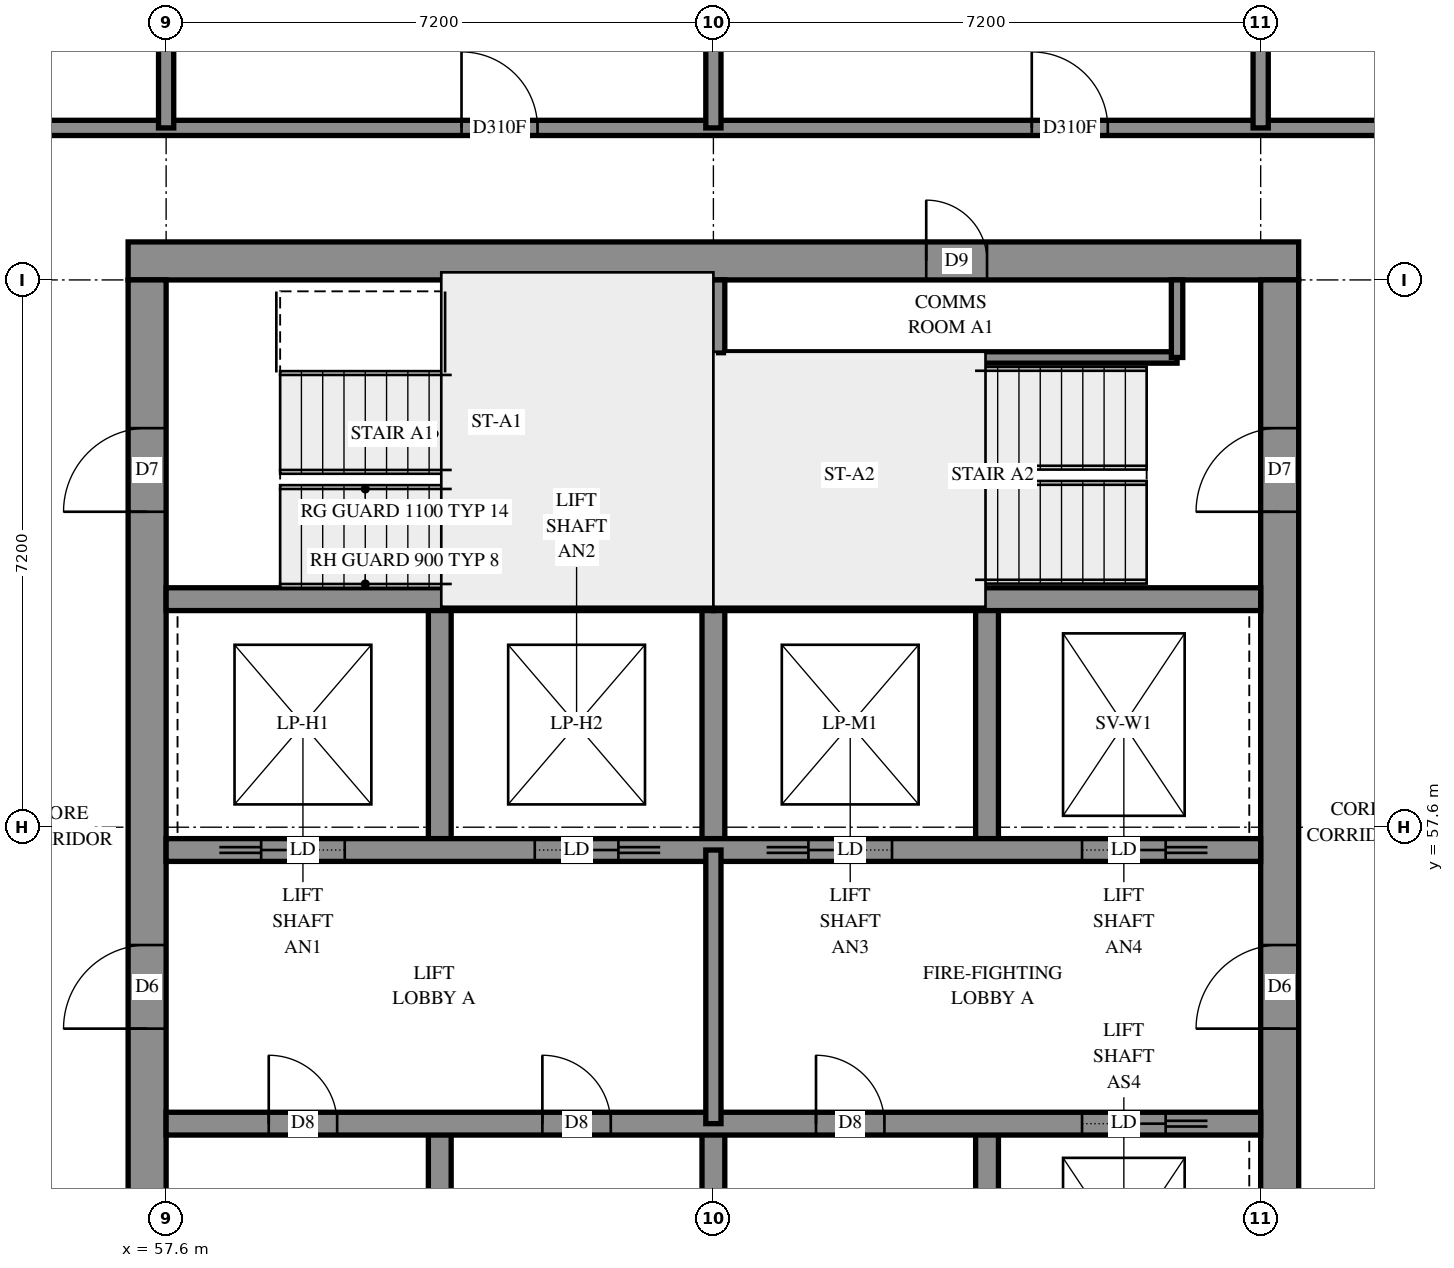
"""IFC4 building model, lengths in metres.
Left out: names, types, materials, properties, quantities, classifications, styles, units other than length and angle.
Written with IfcOpenShell. Run it as: python <this file> out.ifc"""

import sys

from ifc_helpers import new_model, si_unit, direction, frame, frame_2d, origin, place, context, subcontext, project, spatial, rectangle, extrude, element, fill, save


model = new_model("IFC4")
c1 = context("Model", 3, precision=1e-05, world=origin(), true_north=direction((0.0, 1.0)))
c2 = subcontext(c1, "Body", "Model", "MODEL_VIEW")
j1 = project(units=[si_unit("LENGTHUNIT", "METRE"), si_unit("PLANEANGLEUNIT", "RADIAN")], contexts=[c1])
p1 = place(None, origin())
s1 = spatial("IfcSite", under=j1, at=p1, CompositionType="ELEMENT")
p2 = place(p1, origin())
s2 = spatial("IfcBuilding", under=s1, at=p2, CompositionType="ELEMENT")
p3 = place(p2, frame((0.0, 0.0, 196.4)))
s3 = spatial("IfcBuildingStorey", under=s2, at=p3, CompositionType="ELEMENT", Elevation=196.4)
p4 = place(p3, frame((57.1, 65.05, -0.3), z_axis=(0.0, 0.0, 1.0), x_axis=(1.0, 0.0, 0.0)))
e1 = element("IfcWall", 1, at=p4, inside=s3, PredefinedType="SHEAR", context=c2, shape_type="SweptSolid", body=[
    extrude(rectangle(XDim=15.4, YDim=0.5, at=frame_2d((7.7, 0.0))), origin(), (0.0, 0.0, 1.0), 2.7),
])
p5 = place(p4, frame((10.5, 0.0, 0.3)))
e2 = element("IfcOpeningElement", 2, at=p5, cuts=e1, PredefinedType="OPENING", context=c2, shape_type="SweptSolid", body=[
    extrude(rectangle(XDim=0.8, YDim=2.1, at=frame_2d((0.4, 1.05))), frame((0.0, 0.26, 0.0), z_axis=(0.0, -1.0, 0.0), x_axis=(1.0, 0.0, 0.0)), (0.0, 0.0, 1.0), 0.52),
])
p6 = place(p3, frame((57.35, 50.4, -0.3), z_axis=(0.0, 0.0, 1.0), x_axis=(0.0, 1.0, 0.0)))
e3 = element("IfcWall", 3, at=p6, inside=s3, PredefinedType="SHEAR", context=c2, shape_type="SweptSolid", body=[
    extrude(rectangle(XDim=14.4, YDim=0.5, at=frame_2d((7.2, 0.0))), origin(), (0.0, 0.0, 1.0), 2.7),
])
p7 = place(p6, frame((4.55, 0.0, 0.3)))
e4 = element("IfcOpeningElement", 4, at=p7, cuts=e3, PredefinedType="OPENING", context=c2, shape_type="SweptSolid", body=[
    extrude(rectangle(XDim=1.1, YDim=2.1, at=frame_2d((0.55, 1.05))), frame((0.0, 0.26, 0.0), z_axis=(0.0, -1.0, 0.0), x_axis=(1.0, 0.0, 0.0)), (0.0, 0.0, 1.0), 0.52),
])
p8 = place(p6, frame((11.35, 0.0, 0.3)))
e5 = element("IfcOpeningElement", 5, at=p8, cuts=e3, PredefinedType="OPENING", context=c2, shape_type="SweptSolid", body=[
    extrude(rectangle(XDim=1.1, YDim=2.1, at=frame_2d((0.55, 1.05))), frame((0.0, 0.26, 0.0), z_axis=(0.0, -1.0, 0.0), x_axis=(1.0, 0.0, 0.0)), (0.0, 0.0, 1.0), 0.52),
])
p9 = place(p3, frame((72.25, 50.4, -0.3), z_axis=(0.0, 0.0, 1.0), x_axis=(0.0, 1.0, 0.0)))
e6 = element("IfcWall", 6, at=p9, inside=s3, PredefinedType="SHEAR", context=c2, shape_type="SweptSolid", body=[
    extrude(rectangle(XDim=14.4, YDim=0.5, at=frame_2d((7.2, 0.0))), origin(), (0.0, 0.0, 1.0), 2.7),
])
p10 = place(p9, frame((4.55, 0.0, 0.3)))
e7 = element("IfcOpeningElement", 7, at=p10, cuts=e6, PredefinedType="OPENING", context=c2, shape_type="SweptSolid", body=[
    extrude(rectangle(XDim=1.1, YDim=2.1, at=frame_2d((0.55, 1.05))), frame((0.0, 0.26, 0.0), z_axis=(0.0, -1.0, 0.0), x_axis=(1.0, 0.0, 0.0)), (0.0, 0.0, 1.0), 0.52),
])
p11 = place(p9, frame((11.35, 0.0, 0.3)))
e8 = element("IfcOpeningElement", 8, at=p11, cuts=e6, PredefinedType="OPENING", context=c2, shape_type="SweptSolid", body=[
    extrude(rectangle(XDim=1.1, YDim=2.1, at=frame_2d((0.55, 1.05))), frame((0.0, 0.26, 0.0), z_axis=(0.0, -1.0, 0.0), x_axis=(1.0, 0.0, 0.0)), (0.0, 0.0, 1.0), 0.52),
])
for number, where, z_axis, x_axis in (
    (9, (61.2, 50.4, 0.0), (0.0, 0.0, 1.0), (0.0, 1.0, 0.0)),
    (10, (61.2, 57.3, 0.0), (0.0, 0.0, 1.0), (0.0, 1.0, 0.0)),
    (11, (64.8, 50.4, 0.0), (0.0, 0.0, 1.0), (0.0, 1.0, 0.0)),
    (12, (64.8, 57.3, 0.0), (0.0, 0.0, 1.0), (0.0, 1.0, 0.0)),
    (13, (68.4, 50.4, 0.0), (0.0, 0.0, 1.0), (0.0, 1.0, 0.0)),
    (14, (68.4, 57.3, 0.0), (0.0, 0.0, 1.0), (0.0, 1.0, 0.0)),
):
    element("IfcWall", number, at=place(p3, frame(where, z_axis=z_axis, x_axis=x_axis)), inside=s3, PredefinedType="SOLIDWALL", context=c2, shape_type="SweptSolid", body=[
        extrude(rectangle(XDim=3.3, YDim=0.3, at=frame_2d((1.65, 0.0))), origin(), (0.0, 0.0, 1.0), 3.1),
    ])
p12 = place(p3, frame((57.6, 53.7, 0.0), z_axis=(0.0, 0.0, 1.0), x_axis=(1.0, 0.0, 0.0)))
e15 = element("IfcWall", 15, at=p12, inside=s3, PredefinedType="SOLIDWALL", context=c2, shape_type="SweptSolid", body=[
    extrude(rectangle(XDim=14.4, YDim=0.3, at=frame_2d((7.2, 0.0))), origin(), (0.0, 0.0, 1.0), 3.1),
])
p13 = place(p12, frame((1.35, 0.0, 0.0)))
e16 = element("IfcOpeningElement", 16, at=p13, cuts=e15, PredefinedType="OPENING", context=c2, shape_type="SweptSolid", body=[
    extrude(rectangle(XDim=0.9, YDim=2.1, at=frame_2d((0.45, 1.05))), frame((0.0, 0.16, 0.0), z_axis=(0.0, -1.0, 0.0), x_axis=(1.0, 0.0, 0.0)), (0.0, 0.0, 1.0), 0.32),
])
p14 = place(p12, frame((4.95, 0.0, 0.0)))
e17 = element("IfcOpeningElement", 17, at=p14, cuts=e15, PredefinedType="OPENING", context=c2, shape_type="SweptSolid", body=[
    extrude(rectangle(XDim=0.9, YDim=2.1, at=frame_2d((0.45, 1.05))), frame((0.0, 0.16, 0.0), z_axis=(0.0, -1.0, 0.0), x_axis=(1.0, 0.0, 0.0)), (0.0, 0.0, 1.0), 0.32),
])
p15 = place(p12, frame((8.55, 0.0, 0.0)))
e18 = element("IfcOpeningElement", 18, at=p15, cuts=e15, PredefinedType="OPENING", context=c2, shape_type="SweptSolid", body=[
    extrude(rectangle(XDim=0.9, YDim=2.1, at=frame_2d((0.45, 1.05))), frame((0.0, 0.16, 0.0), z_axis=(0.0, -1.0, 0.0), x_axis=(1.0, 0.0, 0.0)), (0.0, 0.0, 1.0), 0.32),
])
p16 = place(p12, frame((12.05, 0.0, 0.0)))
e19 = element("IfcOpeningElement", 19, at=p16, cuts=e15, PredefinedType="OPENING", context=c2, shape_type="SweptSolid", body=[
    extrude(rectangle(XDim=1.1, YDim=2.1, at=frame_2d((0.55, 1.05))), frame((0.0, 0.16, 0.0), z_axis=(0.0, -1.0, 0.0), x_axis=(1.0, 0.0, 0.0)), (0.0, 0.0, 1.0), 0.32),
])
p17 = place(p3, frame((57.6, 57.3, 0.0), z_axis=(0.0, 0.0, 1.0), x_axis=(1.0, 0.0, 0.0)))
e20 = element("IfcWall", 20, at=p17, inside=s3, PredefinedType="SOLIDWALL", context=c2, shape_type="SweptSolid", body=[
    extrude(rectangle(XDim=14.4, YDim=0.3, at=frame_2d((7.2, 0.0))), origin(), (0.0, 0.0, 1.0), 3.1),
])
p18 = place(p17, frame((1.25, 0.0, 0.0)))
e21 = element("IfcOpeningElement", 21, at=p18, cuts=e20, PredefinedType="OPENING", context=c2, shape_type="SweptSolid", body=[
    extrude(rectangle(XDim=1.1, YDim=2.1, at=frame_2d((0.55, 1.05))), frame((0.0, 0.16, 0.0), z_axis=(0.0, -1.0, 0.0), x_axis=(1.0, 0.0, 0.0)), (0.0, 0.0, 1.0), 0.32),
])
p19 = place(p17, frame((4.85, 0.0, 0.0)))
e22 = element("IfcOpeningElement", 22, at=p19, cuts=e20, PredefinedType="OPENING", context=c2, shape_type="SweptSolid", body=[
    extrude(rectangle(XDim=1.1, YDim=2.1, at=frame_2d((0.55, 1.05))), frame((0.0, 0.16, 0.0), z_axis=(0.0, -1.0, 0.0), x_axis=(1.0, 0.0, 0.0)), (0.0, 0.0, 1.0), 0.32),
])
p20 = place(p17, frame((8.45, 0.0, 0.0)))
e23 = element("IfcOpeningElement", 23, at=p20, cuts=e20, PredefinedType="OPENING", context=c2, shape_type="SweptSolid", body=[
    extrude(rectangle(XDim=1.1, YDim=2.1, at=frame_2d((0.55, 1.05))), frame((0.0, 0.16, 0.0), z_axis=(0.0, -1.0, 0.0), x_axis=(1.0, 0.0, 0.0)), (0.0, 0.0, 1.0), 0.32),
])
p21 = place(p17, frame((12.05, 0.0, 0.0)))
e24 = element("IfcOpeningElement", 24, at=p21, cuts=e20, PredefinedType="OPENING", context=c2, shape_type="SweptSolid", body=[
    extrude(rectangle(XDim=1.1, YDim=2.1, at=frame_2d((0.55, 1.05))), frame((0.0, 0.16, 0.0), z_axis=(0.0, -1.0, 0.0), x_axis=(1.0, 0.0, 0.0)), (0.0, 0.0, 1.0), 0.32),
])
for number, where, z_axis, x_axis in (
    (25, (57.6, 60.6, 0.0), (0.0, 0.0, 1.0), (1.0, 0.0, 0.0)),
    (26, (64.8, 60.6, 0.0), (0.0, 0.0, 1.0), (1.0, 0.0, 0.0)),
):
    element("IfcWall", number, at=place(p3, frame(where, z_axis=z_axis, x_axis=x_axis)), inside=s3, PredefinedType="SOLIDWALL", context=c2, shape_type="SweptSolid", body=[
        extrude(rectangle(XDim=7.2, YDim=0.3, at=frame_2d((3.6, 0.0))), origin(), (0.0, 0.0, 1.0), 3.1),
    ])
p22 = place(p3, frame((64.8, 60.6, 0.0), z_axis=(0.0, 0.0, 1.0), x_axis=(0.0, 1.0, 0.0)))
e27 = element("IfcWall", 27, at=p22, inside=s3, PredefinedType="SOLIDWALL", context=c2, shape_type="SweptSolid", body=[
    extrude(rectangle(XDim=4.2, YDim=0.3, at=frame_2d((2.1, 0.0))), origin(), (0.0, 0.0, 1.0), 3.1),
])
p23 = place(p3, frame((64.95, 63.78, 0.0), z_axis=(0.0, 0.0, 1.0), x_axis=(1.0, 0.0, 0.0)))
e28 = element("IfcWall", 28, at=p23, inside=s3, PredefinedType="PARTITIONING", context=c2, shape_type="SweptSolid", body=[
    extrude(rectangle(XDim=5.95, YDim=0.15, at=frame_2d((2.975, 0.0))), origin(), (0.0, 0.0, 1.0), 3.1),
])
p24 = place(p3, frame((70.9, 63.78, 0.0), z_axis=(0.0, 0.0, 1.0), x_axis=(0.0, 1.0, 0.0)))
e29 = element("IfcWall", 29, at=p24, inside=s3, PredefinedType="PARTITIONING", context=c2, shape_type="SweptSolid", body=[
    extrude(rectangle(XDim=1.02, YDim=0.15, at=frame_2d((0.51, 0.0))), origin(), (0.0, 0.0, 1.0), 3.1),
])
p25 = place(p3, frame((64.8, 53.7, 0.0), z_axis=(0.0, 0.0, 1.0), x_axis=(0.0, 1.0, 0.0)))
e30 = element("IfcWall", 30, at=p25, inside=s3, PredefinedType="PARTITIONING", context=c2, shape_type="SweptSolid", body=[
    extrude(rectangle(XDim=3.6, YDim=0.2, at=frame_2d((1.8, 0.0))), origin(), (0.0, 0.0, 1.0), 3.1),
])
p26 = place(p3, frame((55.6, 66.8, 0.0), z_axis=(0.0, 0.0, 1.0), x_axis=(1.0, 0.0, 0.0)))
e31 = element("IfcWall", 31, at=p26, inside=s3, PredefinedType="PARTITIONING", context=c2, shape_type="SweptSolid", body=[
    extrude(rectangle(XDim=18.4, YDim=0.2, at=frame_2d((9.2, 0.0))), origin(), (0.0, 0.0, 1.0), 3.1),
])
p27 = place(p26, frame((5.886, 0.0, 0.0)))
e32 = element("IfcOpeningElement", 32, at=p27, cuts=e31, PredefinedType="OPENING", context=c2, shape_type="SweptSolid", body=[
    extrude(rectangle(XDim=1.0, YDim=2.1, at=frame_2d((0.5, 1.05))), frame((0.0, 0.11, 0.0), z_axis=(0.0, -1.0, 0.0), x_axis=(1.0, 0.0, 0.0)), (0.0, 0.0, 1.0), 0.22),
])
p28 = place(p26, frame((13.389, 0.0, 0.0)))
e33 = element("IfcOpeningElement", 33, at=p28, cuts=e31, PredefinedType="OPENING", context=c2, shape_type="SweptSolid", body=[
    extrude(rectangle(XDim=1.0, YDim=2.1, at=frame_2d((0.5, 1.05))), frame((0.0, 0.11, 0.0), z_axis=(0.0, -1.0, 0.0), x_axis=(1.0, 0.0, 0.0)), (0.0, 0.0, 1.0), 0.22),
])
for number, where, z_axis, x_axis in (
    (34, (57.6, 66.8, 0.0), (0.0, 0.0, 1.0), (0.0, 1.0, 0.0)),
    (35, (64.8, 66.8, 0.0), (0.0, 0.0, 1.0), (0.0, 1.0, 0.0)),
):
    element("IfcWall", number, at=place(p3, frame(where, z_axis=z_axis, x_axis=x_axis)), inside=s3, PredefinedType="PARTITIONING", context=c2, shape_type="SweptSolid", body=[
        extrude(rectangle(XDim=4.8, YDim=0.2, at=frame_2d((2.4, 0.0))), origin(), (0.0, 0.0, 1.0), 3.1),
    ])
p29 = place(p3, frame((72.0, 66.8, 0.0), z_axis=(0.0, 0.0, 1.0), x_axis=(0.0, 1.0, 0.0)))
e36 = element("IfcWall", 36, at=p29, inside=s3, PredefinedType="PARTITIONING", context=c2, shape_type="SweptSolid", body=[
    extrude(rectangle(XDim=4.696, YDim=0.2, at=frame_2d((2.348, 0.0))), origin(), (0.0, 0.0, 1.0), 3.1),
])
p30 = place(p5, origin())
e37 = element("IfcDoor", 37, at=p30, inside=s3, OperationType="SINGLE_SWING_RIGHT", PredefinedType="DOOR", context=c2, shape_type="SweptSolid", body=[
    extrude(rectangle(XDim=0.8, YDim=2.1, at=frame_2d((0.4, 1.05))), frame((0.0, 0.025, 0.0), z_axis=(0.0, -1.0, 0.0), x_axis=(1.0, 0.0, 0.0)), (0.0, 0.0, 1.0), 0.05),
])
fill(e2, e37)
p31 = place(p7, origin())
e38 = element("IfcDoor", 38, at=p31, inside=s3, OperationType="DOUBLE_DOOR_SINGLE_SWING", PredefinedType="DOOR", context=c2, shape_type="SweptSolid", body=[
    extrude(rectangle(XDim=1.1, YDim=2.1, at=frame_2d((0.55, 1.05))), frame((0.0, 0.025, 0.0), z_axis=(0.0, -1.0, 0.0), x_axis=(1.0, 0.0, 0.0)), (0.0, 0.0, 1.0), 0.05),
])
fill(e4, e38)
p32 = place(p10, origin())
e39 = element("IfcDoor", 39, at=p32, inside=s3, OperationType="DOUBLE_DOOR_SINGLE_SWING", PredefinedType="DOOR", context=c2, shape_type="SweptSolid", body=[
    extrude(rectangle(XDim=1.1, YDim=2.1, at=frame_2d((0.55, 1.05))), frame((0.0, 0.025, 0.0), z_axis=(0.0, -1.0, 0.0), x_axis=(1.0, 0.0, 0.0)), (0.0, 0.0, 1.0), 0.05),
])
fill(e7, e39)
p33 = place(p8, origin())
e40 = element("IfcDoor", 40, at=p33, inside=s3, OperationType="SINGLE_SWING_LEFT", PredefinedType="DOOR", context=c2, shape_type="SweptSolid", body=[
    extrude(rectangle(XDim=1.1, YDim=2.1, at=frame_2d((0.55, 1.05))), frame((0.0, 0.025, 0.0), z_axis=(0.0, -1.0, 0.0), x_axis=(1.0, 0.0, 0.0)), (0.0, 0.0, 1.0), 0.05),
])
fill(e5, e40)
p34 = place(p11, origin())
e41 = element("IfcDoor", 41, at=p34, inside=s3, OperationType="SINGLE_SWING_RIGHT", PredefinedType="DOOR", context=c2, shape_type="SweptSolid", body=[
    extrude(rectangle(XDim=1.1, YDim=2.1, at=frame_2d((0.55, 1.05))), frame((0.0, 0.025, 0.0), z_axis=(0.0, -1.0, 0.0), x_axis=(1.0, 0.0, 0.0)), (0.0, 0.0, 1.0), 0.05),
])
fill(e8, e41)
p35 = place(p13, origin())
e42 = element("IfcDoor", 42, at=p35, inside=s3, OperationType="SINGLE_SWING_LEFT", PredefinedType="DOOR", context=c2, shape_type="SweptSolid", body=[
    extrude(rectangle(XDim=0.9, YDim=2.1, at=frame_2d((0.45, 1.05))), frame((0.0, 0.025, 0.0), z_axis=(0.0, -1.0, 0.0), x_axis=(1.0, 0.0, 0.0)), (0.0, 0.0, 1.0), 0.05),
])
fill(e16, e42)
p36 = place(p14, origin())
e43 = element("IfcDoor", 43, at=p36, inside=s3, OperationType="SINGLE_SWING_LEFT", PredefinedType="DOOR", context=c2, shape_type="SweptSolid", body=[
    extrude(rectangle(XDim=0.9, YDim=2.1, at=frame_2d((0.45, 1.05))), frame((0.0, 0.025, 0.0), z_axis=(0.0, -1.0, 0.0), x_axis=(1.0, 0.0, 0.0)), (0.0, 0.0, 1.0), 0.05),
])
fill(e17, e43)
p37 = place(p15, origin())
e44 = element("IfcDoor", 44, at=p37, inside=s3, OperationType="SINGLE_SWING_LEFT", PredefinedType="DOOR", context=c2, shape_type="SweptSolid", body=[
    extrude(rectangle(XDim=0.9, YDim=2.1, at=frame_2d((0.45, 1.05))), frame((0.0, 0.025, 0.0), z_axis=(0.0, -1.0, 0.0), x_axis=(1.0, 0.0, 0.0)), (0.0, 0.0, 1.0), 0.05),
])
fill(e18, e44)
p38 = place(p16, origin())
e45 = element("IfcDoor", 45, at=p38, inside=s3, OperationType="SLIDING_TO_RIGHT", PredefinedType="DOOR", context=c2, shape_type="SweptSolid", body=[
    extrude(rectangle(XDim=1.1, YDim=2.1, at=frame_2d((0.55, 1.05))), frame((0.0, 0.025, 0.0), z_axis=(0.0, -1.0, 0.0), x_axis=(1.0, 0.0, 0.0)), (0.0, 0.0, 1.0), 0.05),
])
fill(e19, e45)
p39 = place(p18, origin())
e46 = element("IfcDoor", 46, at=p39, inside=s3, OperationType="SLIDING_TO_LEFT", PredefinedType="DOOR", context=c2, shape_type="SweptSolid", body=[
    extrude(rectangle(XDim=1.1, YDim=2.1, at=frame_2d((0.55, 1.05))), frame((0.0, 0.025, 0.0), z_axis=(0.0, -1.0, 0.0), x_axis=(1.0, 0.0, 0.0)), (0.0, 0.0, 1.0), 0.05),
])
fill(e21, e46)
p40 = place(p19, origin())
e47 = element("IfcDoor", 47, at=p40, inside=s3, OperationType="SLIDING_TO_RIGHT", PredefinedType="DOOR", context=c2, shape_type="SweptSolid", body=[
    extrude(rectangle(XDim=1.1, YDim=2.1, at=frame_2d((0.55, 1.05))), frame((0.0, 0.025, 0.0), z_axis=(0.0, -1.0, 0.0), x_axis=(1.0, 0.0, 0.0)), (0.0, 0.0, 1.0), 0.05),
])
fill(e22, e47)
p41 = place(p20, origin())
e48 = element("IfcDoor", 48, at=p41, inside=s3, OperationType="SLIDING_TO_LEFT", PredefinedType="DOOR", context=c2, shape_type="SweptSolid", body=[
    extrude(rectangle(XDim=1.1, YDim=2.1, at=frame_2d((0.55, 1.05))), frame((0.0, 0.025, 0.0), z_axis=(0.0, -1.0, 0.0), x_axis=(1.0, 0.0, 0.0)), (0.0, 0.0, 1.0), 0.05),
])
fill(e23, e48)
p42 = place(p21, origin())
e49 = element("IfcDoor", 49, at=p42, inside=s3, OperationType="SLIDING_TO_RIGHT", PredefinedType="DOOR", context=c2, shape_type="SweptSolid", body=[
    extrude(rectangle(XDim=1.1, YDim=2.1, at=frame_2d((0.55, 1.05))), frame((0.0, 0.025, 0.0), z_axis=(0.0, -1.0, 0.0), x_axis=(1.0, 0.0, 0.0)), (0.0, 0.0, 1.0), 0.05),
])
fill(e24, e49)
p43 = place(p27, origin())
e50 = element("IfcDoor", 50, at=p43, inside=s3, OperationType="SINGLE_SWING_RIGHT", PredefinedType="DOOR", context=c2, shape_type="SweptSolid", body=[
    extrude(rectangle(XDim=1.0, YDim=2.1, at=frame_2d((0.5, 1.05))), frame((0.0, 0.025, 0.0), z_axis=(0.0, -1.0, 0.0), x_axis=(1.0, 0.0, 0.0)), (0.0, 0.0, 1.0), 0.05),
])
fill(e32, e50)
p44 = place(p28, origin())
e51 = element("IfcDoor", 51, at=p44, inside=s3, OperationType="SINGLE_SWING_RIGHT", PredefinedType="DOOR", context=c2, shape_type="SweptSolid", body=[
    extrude(rectangle(XDim=1.0, YDim=2.1, at=frame_2d((0.5, 1.05))), frame((0.0, 0.025, 0.0), z_axis=(0.0, -1.0, 0.0), x_axis=(1.0, 0.0, 0.0)), (0.0, 0.0, 1.0), 0.05),
])
fill(e33, e51)
save(model, sys.argv[1])
